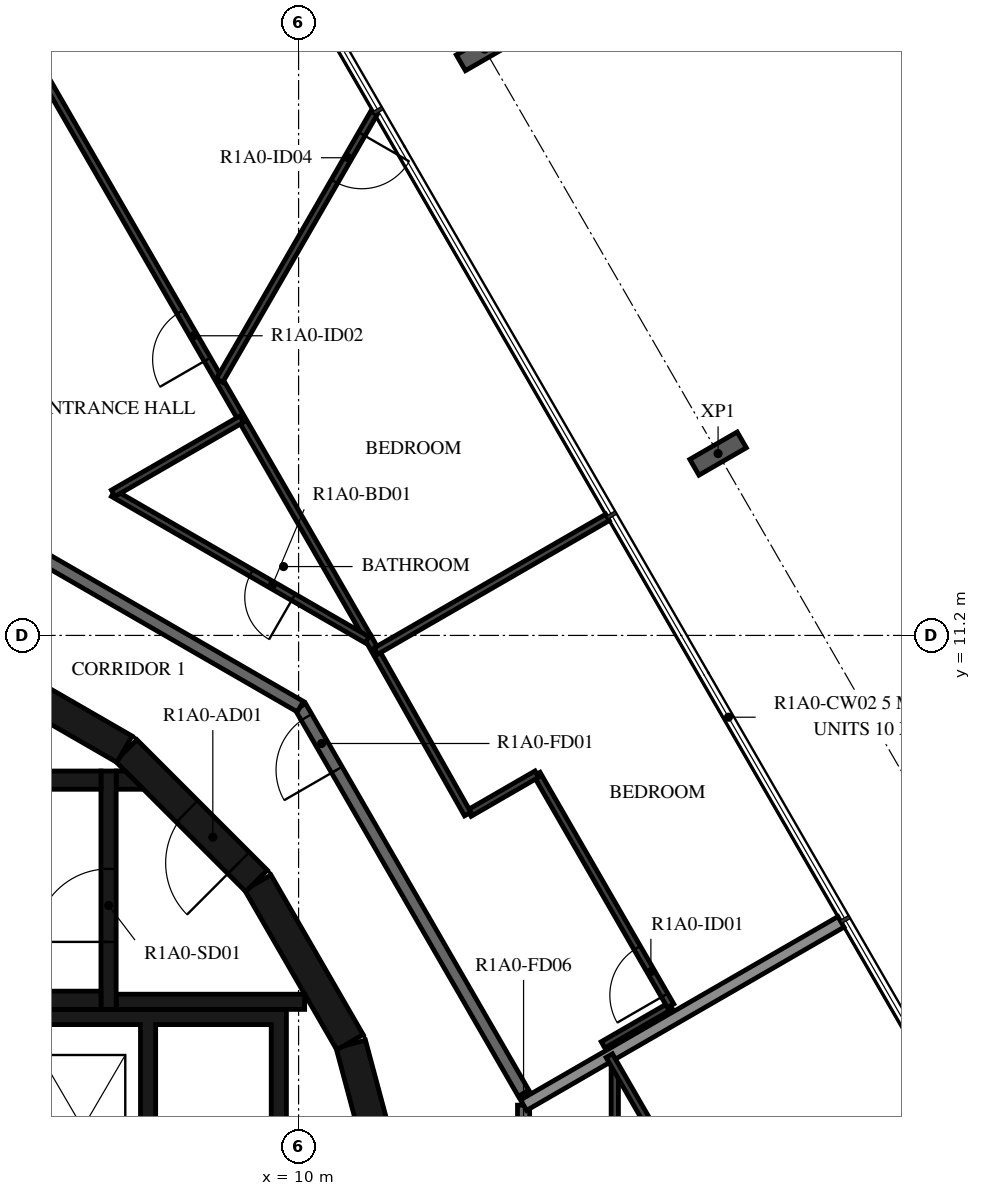
"""IFC4 building model, lengths in metres.
Left out: names, types, materials, properties, quantities, classifications, styles, units other than length and angle.
Written with IfcOpenShell. Run it as: python <this file> out.ifc"""

import sys

from ifc_helpers import new_model, si_unit, direction, frame, frame_2d, origin, origin_2d, place, context, subcontext, project, spatial, polyline, rectangle, i_section, outline, extrude, element, fill, save


model = new_model("IFC4")
c1 = context("Model", 3, precision=1e-05, world=origin(), true_north=direction((0.0, 1.0)))
c2 = subcontext(c1, "Body", "Model", "MODEL_VIEW")
j1 = project(units=[si_unit("LENGTHUNIT", "METRE"), si_unit("PLANEANGLEUNIT", "RADIAN")], contexts=[c1])
p1 = place(None, origin())
s1 = spatial("IfcSite", under=j1, at=p1, CompositionType="ELEMENT")
p2 = place(p1, origin())
s2 = spatial("IfcBuilding", under=s1, at=p2, CompositionType="ELEMENT")
p3 = place(p2, frame((0.0, 0.0, 38.4)))
s3 = spatial("IfcBuildingStorey", under=s2, at=p3, CompositionType="ELEMENT", Elevation=38.4)
for number, where, z_axis, x_axis in (
    (1, (16.899, 14.19, -0.45), (0.0, 0.0, 1.0), (0.5, -0.866, 0.0)),
    (2, (13.059, 20.842, -0.45), (0.0, 0.0, 1.0), (0.5, -0.866, 0.0)),
):
    element("IfcColumn", number, at=place(p3, frame(where, z_axis=z_axis, x_axis=x_axis)), inside=s3, PredefinedType="COLUMN", context=c2, shape_type="SweptSolid", body=[
        extrude(i_section(OverallWidth=0.3, OverallDepth=0.9, WebThickness=0.019, FlangeThickness=0.035, FilletRadius=0.03, at=origin_2d()), origin(), (0.0, 0.0, 1.0), 3.57),
    ])
for number, where, z_axis, x_axis in (
    (3, (11.643, 1.55, 0.0), (0.0, 0.0, 1.0), (-0.259, 0.966, 0.0)),
    (4, (10.845, 4.51, 0.0), (0.0, 0.0, 1.0), (-0.5, 0.866, 0.0)),
):
    element("IfcWall", number, at=place(p3, frame(where, z_axis=z_axis, x_axis=x_axis)), inside=s3, PredefinedType="SHEAR", context=c2, shape_type="SweptSolid", body=[
        extrude(rectangle(XDim=3.033, YDim=0.5, at=frame_2d((1.516, 0.0))), origin(), (0.0, 0.0, 1.0), 3.12),
    ])
p4 = place(p3, frame((9.308, 7.164, 0.0), z_axis=(0.0, 0.0, 1.0), x_axis=(-0.707106781187, 0.707106781187, 0.0)))
e5 = element("IfcWall", 5, at=p4, inside=s3, PredefinedType="SHEAR", context=c2, shape_type="SweptSolid", body=[
    extrude(rectangle(XDim=3.032, YDim=0.5, at=frame_2d((1.516, 0.0))), origin(), (0.0, 0.0, 1.0), 3.12),
])
p5 = place(p4, frame((0.416, 0.0, 0.0)))
e6 = element("IfcOpeningElement", 6, at=p5, cuts=e5, PredefinedType="OPENING", context=c2, shape_type="SweptSolid", body=[
    extrude(rectangle(XDim=1.2, YDim=2.1, at=frame_2d((0.6, 1.05))), frame((0.0, 0.26, 0.0), z_axis=(0.0, -1.0, 0.0), x_axis=(1.0, 0.0, 0.0)), (0.0, 0.0, 1.0), 0.52),
])
p6 = place(p3, frame((7.137, 9.329, 0.0), z_axis=(0.0, 0.0, 1.0), x_axis=(-0.865975092491, 0.500087131594, 0.0)))
e7 = element("IfcWall", 7, at=p6, inside=s3, PredefinedType="SHEAR", context=c2, shape_type="SweptSolid", body=[
    extrude(rectangle(XDim=3.033, YDim=0.5, at=frame_2d((1.516, 0.0))), origin(), (0.0, 0.0, 1.0), 3.12),
])
for number, where, z_axis, x_axis in (
    (8, (0.0, 5.2, 0.0), (0.0, 0.0, 1.0), (1.0, 0.0, 0.0)),
    (9, (0.0, 8.82, 0.0), (0.0, 0.0, 1.0), (1.0, 0.0, 0.0)),
):
    element("IfcWall", number, at=place(p3, frame(where, z_axis=z_axis, x_axis=x_axis)), inside=s3, PredefinedType="SHEAR", context=c2, shape_type="SweptSolid", body=[
        extrude(rectangle(XDim=6.75, YDim=0.3, at=frame_2d((3.375, 0.0))), origin(), (0.0, 0.0, 1.0), 3.12),
    ])
p7 = place(p3, frame((6.875, 5.05, 0.0), z_axis=(0.0, 0.0, 1.0), x_axis=(0.0, 1.0, 0.0)))
e10 = element("IfcWall", 10, at=p7, inside=s3, PredefinedType="SHEAR", context=c2, shape_type="SweptSolid", body=[
    extrude(rectangle(XDim=3.92, YDim=0.25, at=frame_2d((1.96, 0.0))), origin(), (0.0, 0.0, 1.0), 3.12),
])
p8 = place(p7, frame((1.11, 0.0, 0.0)))
e11 = element("IfcOpeningElement", 11, at=p8, cuts=e10, PredefinedType="OPENING", context=c2, shape_type="SweptSolid", body=[
    extrude(rectangle(XDim=1.2, YDim=2.1, at=frame_2d((0.6, 1.05))), frame((0.0, 0.135, 0.0), z_axis=(0.0, -1.0, 0.0), x_axis=(1.0, 0.0, 0.0)), (0.0, 0.0, 1.0), 0.27),
])
p9 = place(p3, frame((7.0, 5.175, 0.0), z_axis=(0.0, 0.0, 1.0), x_axis=(1.0, 0.0, 0.0)))
e12 = element("IfcWall", 12, at=p9, inside=s3, PredefinedType="SHEAR", context=c2, shape_type="SweptSolid", body=[
    extrude(rectangle(XDim=3.1, YDim=0.25, at=frame_2d((1.55, 0.0))), origin(), (0.0, 0.0, 1.0), 3.12),
])
p10 = place(p3, origin())
e13 = element("IfcWall", 13, at=p10, inside=s3, PredefinedType="SHEAR", context=c2, shape_type="SweptSolid", body=[
    extrude(outline(polyline([(7.448, 8.67), (7.0, 8.67), (7.0, 8.97), (7.148, 8.97), (7.448, 8.67)])), origin(), (0.0, 0.0, 1.0), 3.12),
])
p11 = place(p3, origin())
e14 = element("IfcWall", 14, at=p11, inside=s3, PredefinedType="SHEAR", context=c2, shape_type="SweptSolid", body=[
    extrude(outline(polyline([(-9.55, 4.8), (-7.65, 4.8), (-7.65, 1.9), (-7.4, 1.9), (-7.4, 4.8), (-5.5, 4.8), (-5.5, 1.9), (-5.25, 1.9), (-5.25, 4.8), (-3.35, 4.8), (-3.35, 1.9), (-3.1, 1.9), (-3.1, 4.8), (-1.2, 4.8), (-1.2, 1.9), (-0.95, 1.9), (-0.95, 4.8), (0.95, 4.8), (0.95, 1.9), (1.2, 1.9), (1.2, 4.8), (3.1, 4.8), (3.1, 1.9), (3.35, 1.9), (3.35, 4.8), (5.25, 4.8), (5.25, 1.9), (5.5, 1.9), (5.5, 4.8), (7.4, 4.8), (7.4, 1.9), (7.65, 1.9), (7.65, 4.8), (9.55, 4.8), (9.55, 1.9), (9.8, 1.9), (9.8, 4.8), (9.8, 5.05), (-9.8, 5.05), (-9.8, 4.8), (-9.8, 1.9), (-9.55, 1.9), (-9.55, 4.8)])), origin(), (0.0, 0.0, 1.0), 3.12),
])
p12 = place(p3, frame((13.7, 3.671, 0.0), z_axis=(0.0, 0.0, 1.0), x_axis=(-0.500001669485, 0.866024439905, 0.0)))
e15 = element("IfcWall", 15, at=p12, inside=s3, PredefinedType="STANDARD", context=c2, shape_type="SweptSolid", body=[
    extrude(rectangle(XDim=7.342, YDim=0.2, at=frame_2d((3.671, 0.0))), origin(), (0.0, 0.0, 1.0), 3.12),
])
p13 = place(p12, frame((6.142, 0.0, 0.0)))
e16 = element("IfcOpeningElement", 16, at=p13, cuts=e15, PredefinedType="OPENING", context=c2, shape_type="SweptSolid", body=[
    extrude(rectangle(XDim=1.0, YDim=2.1, at=frame_2d((0.5, 1.05))), frame((0.0, 0.11, 0.0), z_axis=(0.0, -1.0, 0.0), x_axis=(1.0, 0.0, 0.0)), (0.0, 0.0, 1.0), 0.22),
])
p14 = place(p3, frame((10.029, 10.029, 0.0), z_axis=(0.0, 0.0, 1.0), x_axis=(-0.866024439905, 0.500001669485, 0.0)))
e17 = element("IfcWall", 17, at=p14, inside=s3, PredefinedType="STANDARD", context=c2, shape_type="SweptSolid", body=[
    extrude(rectangle(XDim=7.342, YDim=0.2, at=frame_2d((3.671, 0.0))), origin(), (0.0, 0.0, 1.0), 3.12),
])
p15 = place(p3, frame((13.7, -3.671, 0.0), z_axis=(0.0, 0.0, 1.0), x_axis=(0.0, 1.0, 0.0)))
e18 = element("IfcWall", 18, at=p15, inside=s3, PredefinedType="STANDARD", context=c2, shape_type="SweptSolid", body=[
    extrude(rectangle(XDim=7.146, YDim=0.2, at=frame_2d((3.573, 0.0))), origin(), (0.0, 0.0, 1.0), 3.12),
])
p16 = place(p15, frame((5.947, 0.0, 0.0)))
e19 = element("IfcOpeningElement", 19, at=p16, cuts=e18, PredefinedType="OPENING", context=c2, shape_type="SweptSolid", body=[
    extrude(rectangle(XDim=1.0, YDim=2.1, at=frame_2d((0.5, 1.05))), frame((0.0, 0.11, 0.0), z_axis=(0.0, -1.0, 0.0), x_axis=(1.0, 0.0, 0.0)), (0.0, 0.0, 1.0), 0.22),
])
p17 = place(p3, frame((13.7, 3.476, 0.0), z_axis=(0.0, 0.0, 1.0), x_axis=(0.866013584312, 0.500020471368, 0.0)))
e20 = element("IfcWall", 20, at=p17, inside=s3, PredefinedType="STANDARD", context=c2, shape_type="SweptSolid", body=[
    extrude(rectangle(XDim=6.028, YDim=0.2, at=frame_2d((3.014, 0.0))), origin(), (0.0, 0.0, 1.0), 2.73),
])
p18 = place(p3, frame((15.007, 4.467, 0.0), z_axis=(0.0, 0.0, 1.0), x_axis=(0.86599869919, 0.500046250861, 0.0)))
e21 = element("IfcWall", 21, at=p18, inside=s3, PredefinedType="PARTITIONING", context=c2, shape_type="SweptSolid", body=[
    extrude(rectangle(XDim=1.284, YDim=0.12, at=frame_2d((0.642, 0.0))), origin(), (0.0, 0.0, 1.0), 3.12),
])
p19 = place(p3, frame((16.119, 5.109, 0.0), z_axis=(0.0, 0.0, 1.0), x_axis=(-0.499988222896, 0.866032203192, 0.0)))
e22 = element("IfcWall", 22, at=p19, inside=s3, PredefinedType="PARTITIONING", context=c2, shape_type="SweptSolid", body=[
    extrude(rectangle(XDim=4.4, YDim=0.12, at=frame_2d((2.2, 0.0))), origin(), (0.0, 0.0, 1.0), 3.12),
])
p20 = place(p19, frame((0.2, 0.0, 0.0)))
e23 = element("IfcOpeningElement", 23, at=p20, cuts=e22, PredefinedType="OPENING", context=c2, shape_type="SweptSolid", body=[
    extrude(rectangle(XDim=0.9, YDim=2.1, at=frame_2d((0.45, 1.05))), frame((0.0, 0.07, 0.0), z_axis=(0.0, -1.0, 0.0), x_axis=(1.0, 0.0, 0.0)), (0.0, 0.0, 1.0), 0.14),
])
p21 = place(p3, frame((13.919, 8.919, 0.0), z_axis=(0.0, 0.0, 1.0), x_axis=(-0.86599869919, -0.500046250861, 0.0)))
e24 = element("IfcWall", 24, at=p21, inside=s3, PredefinedType="PARTITIONING", context=c2, shape_type="SweptSolid", body=[
    extrude(rectangle(XDim=1.284, YDim=0.12, at=frame_2d((0.642, 0.0))), origin(), (0.0, 0.0, 1.0), 3.12),
])
p22 = place(p3, frame((12.781, 8.262, 0.0), z_axis=(0.0, 0.0, 1.0), x_axis=(-0.492233259633, 0.870463335305, 0.0)))
e25 = element("IfcWall", 25, at=p22, inside=s3, PredefinedType="PARTITIONING", context=c2, shape_type="SweptSolid", body=[
    extrude(rectangle(XDim=3.336, YDim=0.12, at=frame_2d((1.668, 0.0))), origin(), (0.0, 0.0, 1.0), 3.12),
])
p23 = place(p3, frame((11.139, 11.167, 0.0), z_axis=(0.0, 0.0, 1.0), x_axis=(-0.499994660107, 0.866028486751, 0.0)))
e26 = element("IfcWall", 26, at=p23, inside=s3, PredefinedType="PARTITIONING", context=c2, shape_type="SweptSolid", body=[
    extrude(rectangle(XDim=15.786, YDim=0.12, at=frame_2d((7.893, 0.0))), origin(), (0.0, 0.0, 1.0), 3.12),
])
p24 = place(p23, frame((5.279, 0.0, 0.0)))
e27 = element("IfcOpeningElement", 27, at=p24, cuts=e26, PredefinedType="OPENING", context=c2, shape_type="SweptSolid", body=[
    extrude(rectangle(XDim=0.9, YDim=2.1, at=frame_2d((0.45, 1.05))), frame((0.0, 0.07, 0.0), z_axis=(0.0, -1.0, 0.0), x_axis=(1.0, 0.0, 0.0)), (0.0, 0.0, 1.0), 0.14),
])
p25 = place(p23, frame((12.23, 0.0, 0.0)))
e28 = element("IfcOpeningElement", 28, at=p25, cuts=e26, PredefinedType="OPENING", context=c2, shape_type="SweptSolid", body=[
    extrude(rectangle(XDim=0.9, YDim=2.1, at=frame_2d((0.45, 1.05))), frame((0.0, 0.07, 0.0), z_axis=(0.0, -1.0, 0.0), x_axis=(1.0, 0.0, 0.0)), (0.0, 0.0, 1.0), 0.14),
])
p26 = place(p3, frame((11.127, 11.127, 0.0), z_axis=(0.0, 0.0, 1.0), x_axis=(-0.866043916853, 0.499967933054, 0.0)))
e29 = element("IfcWall", 29, at=p26, inside=s3, PredefinedType="PARTITIONING", context=c2, shape_type="SweptSolid", body=[
    extrude(rectangle(XDim=4.821, YDim=0.12, at=frame_2d((2.411, 0.0))), origin(), (0.0, 0.0, 1.0), 3.12),
])
p27 = place(p26, frame((1.4, 0.0, 0.0)))
e30 = element("IfcOpeningElement", 30, at=p27, cuts=e29, PredefinedType="OPENING", context=c2, shape_type="SweptSolid", body=[
    extrude(rectangle(XDim=0.8, YDim=2.1, at=frame_2d((0.4, 1.05))), frame((0.0, 0.07, 0.0), z_axis=(0.0, -1.0, 0.0), x_axis=(1.0, 0.0, 0.0)), (0.0, 0.0, 1.0), 0.14),
])
p28 = place(p3, frame((6.952, 13.538, 0.0), z_axis=(0.0, 0.0, 1.0), x_axis=(0.866030657337, 0.49999090047, 0.0)))
e31 = element("IfcWall", 31, at=p28, inside=s3, PredefinedType="PARTITIONING", context=c2, shape_type="SweptSolid", body=[
    extrude(rectangle(XDim=2.44, YDim=0.12, at=frame_2d((1.22, 0.0))), origin(), (0.0, 0.0, 1.0), 3.12),
])
p29 = place(p3, frame((15.08, 13.14, 0.0), z_axis=(0.0, 0.0, 1.0), x_axis=(-0.866032203192, -0.499988222896, 0.0)))
e32 = element("IfcWall", 32, at=p29, inside=s3, PredefinedType="PARTITIONING", context=c2, shape_type="SweptSolid", body=[
    extrude(rectangle(XDim=4.4, YDim=0.12, at=frame_2d((2.2, 0.0))), origin(), (0.0, 0.0, 1.0), 2.73),
])
p30 = place(p3, frame((11.24, 19.792, 0.0), z_axis=(0.0, 0.0, 1.0), x_axis=(-0.499978956711, -0.866037552792, 0.0)))
e33 = element("IfcWall", 33, at=p30, inside=s3, PredefinedType="PARTITIONING", context=c2, shape_type="SweptSolid", body=[
    extrude(rectangle(XDim=5.081, YDim=0.12, at=frame_2d((2.541, 0.0))), origin(), (0.0, 0.0, 1.0), 3.12),
])
p31 = place(p30, frame((0.4, 0.0, 0.0)))
e34 = element("IfcOpeningElement", 34, at=p31, cuts=e33, PredefinedType="OPENING", context=c2, shape_type="SweptSolid", body=[
    extrude(rectangle(XDim=0.9, YDim=2.1, at=frame_2d((0.45, 1.05))), frame((0.0, 0.07, 0.0), z_axis=(0.0, -1.0, 0.0), x_axis=(1.0, 0.0, 0.0)), (0.0, 0.0, 1.0), 0.14),
])
p32 = place(p3, frame((15.2, -4.073, 0.0), z_axis=(0.0, 0.0, 1.0), x_axis=(0.0, 1.0, 0.0)))
e35 = element("IfcWall", 35, at=p32, inside=s3, PredefinedType="PARTITIONING", context=c2, shape_type="SweptSolid", body=[
    extrude(rectangle(XDim=8.146, YDim=0.12, at=frame_2d((4.073, 0.0))), origin(), (0.0, 0.0, 1.0), 3.12),
])
p33 = place(p32, frame((1.357, 0.0, 0.0)))
e36 = element("IfcOpeningElement", 36, at=p33, cuts=e35, PredefinedType="OPENING", context=c2, shape_type="SweptSolid", body=[
    extrude(rectangle(XDim=0.8, YDim=2.1, at=frame_2d((0.4, 1.05))), frame((0.0, 0.07, 0.0), z_axis=(0.0, -1.0, 0.0), x_axis=(1.0, 0.0, 0.0)), (0.0, 0.0, 1.0), 0.14),
])
p34 = place(p3, frame((15.11, 4.289, 0.0), z_axis=(0.0, 0.0, 1.0), x_axis=(0.500001702147, -0.866024421047, 0.0)))
e37 = element("IfcWall", 37, at=p34, inside=s3, PredefinedType="PARTITIONING", context=c2, shape_type="SweptSolid", body=[
    extrude(rectangle(XDim=6.458, YDim=0.12, at=frame_2d((3.229, 0.0))), origin(), (0.0, 0.0, 1.0), 3.12),
])
p35 = place(p8, origin())
e38 = element("IfcDoor", 38, at=p35, inside=s3, OperationType="SINGLE_SWING_LEFT", PredefinedType="DOOR", context=c2, shape_type="SweptSolid", body=[
    extrude(rectangle(XDim=1.2, YDim=2.1, at=frame_2d((0.6, 1.05))), frame((0.0, 0.025, 0.0), z_axis=(0.0, -1.0, 0.0), x_axis=(1.0, 0.0, 0.0)), (0.0, 0.0, 1.0), 0.05),
])
fill(e11, e38)
p36 = place(p5, origin())
e39 = element("IfcDoor", 39, at=p36, inside=s3, OperationType="SINGLE_SWING_RIGHT", PredefinedType="DOOR", context=c2, shape_type="SweptSolid", body=[
    extrude(rectangle(XDim=1.2, YDim=2.1, at=frame_2d((0.6, 1.05))), frame((0.0, 0.025, 0.0), z_axis=(0.0, -1.0, 0.0), x_axis=(1.0, 0.0, 0.0)), (0.0, 0.0, 1.0), 0.05),
])
fill(e6, e39)
p37 = place(p13, origin())
e40 = element("IfcDoor", 40, at=p37, inside=s3, OperationType="SINGLE_SWING_RIGHT", PredefinedType="DOOR", context=c2, shape_type="SweptSolid", body=[
    extrude(rectangle(XDim=1.0, YDim=2.1, at=frame_2d((0.5, 1.05))), frame((0.0, 0.025, 0.0), z_axis=(0.0, -1.0, 0.0), x_axis=(1.0, 0.0, 0.0)), (0.0, 0.0, 1.0), 0.05),
])
fill(e16, e40)
p38 = place(p20, origin())
e41 = element("IfcDoor", 41, at=p38, inside=s3, OperationType="SINGLE_SWING_LEFT", PredefinedType="DOOR", context=c2, shape_type="SweptSolid", body=[
    extrude(rectangle(XDim=0.9, YDim=2.1, at=frame_2d((0.45, 1.05))), frame((0.0, 0.025, 0.0), z_axis=(0.0, -1.0, 0.0), x_axis=(1.0, 0.0, 0.0)), (0.0, 0.0, 1.0), 0.05),
])
fill(e23, e41)
p39 = place(p27, origin())
e42 = element("IfcDoor", 42, at=p39, inside=s3, OperationType="SINGLE_SWING_RIGHT", PredefinedType="DOOR", context=c2, shape_type="SweptSolid", body=[
    extrude(rectangle(XDim=0.8, YDim=2.1, at=frame_2d((0.4, 1.05))), frame((0.0, 0.025, 0.0), z_axis=(0.0, -1.0, 0.0), x_axis=(1.0, 0.0, 0.0)), (0.0, 0.0, 1.0), 0.05),
])
fill(e30, e42)
p40 = place(p24, origin())
e43 = element("IfcDoor", 43, at=p40, inside=s3, OperationType="SINGLE_SWING_RIGHT", PredefinedType="DOOR", context=c2, shape_type="SweptSolid", body=[
    extrude(rectangle(XDim=0.9, YDim=2.1, at=frame_2d((0.45, 1.05))), frame((0.0, 0.025, 0.0), z_axis=(0.0, -1.0, 0.0), x_axis=(1.0, 0.0, 0.0)), (0.0, 0.0, 1.0), 0.05),
])
fill(e27, e43)
p41 = place(p31, origin())
e44 = element("IfcDoor", 44, at=p41, inside=s3, OperationType="SINGLE_SWING_LEFT", PredefinedType="DOOR", context=c2, shape_type="SweptSolid", body=[
    extrude(rectangle(XDim=0.9, YDim=2.1, at=frame_2d((0.45, 1.05))), frame((0.0, 0.025, 0.0), z_axis=(0.0, -1.0, 0.0), x_axis=(1.0, 0.0, 0.0)), (0.0, 0.0, 1.0), 0.05),
])
fill(e34, e44)
save(model, sys.argv[1])
